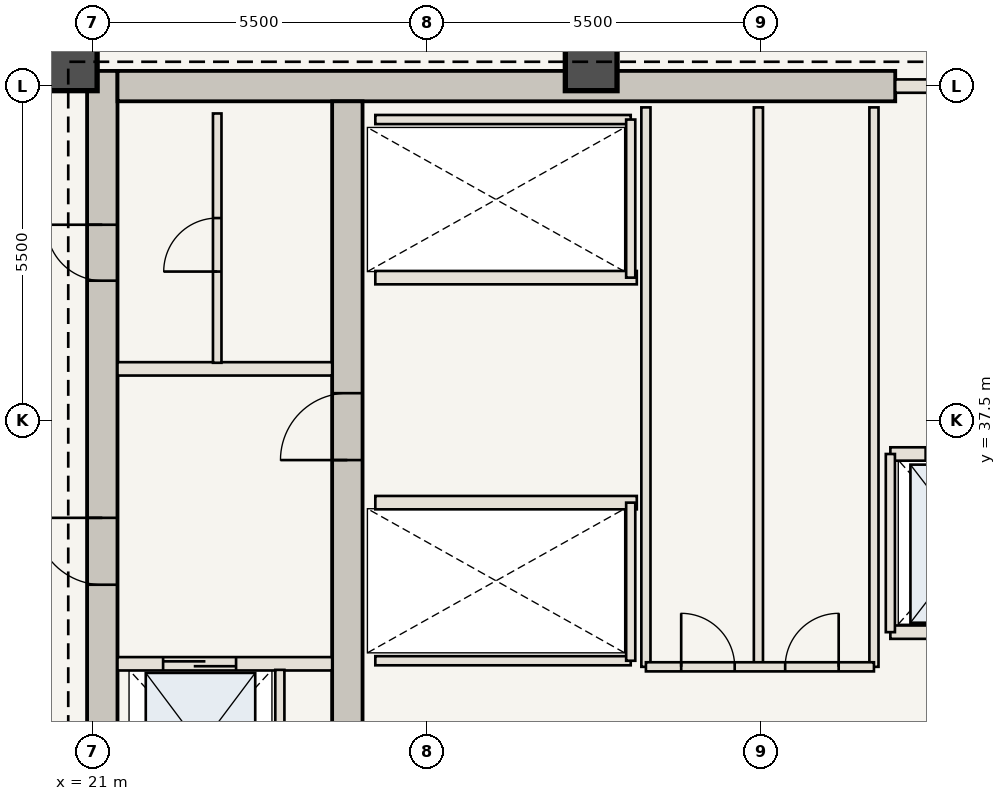
"""IFC4 building model, lengths in metres.
Left out: names, types, materials, properties, quantities, classifications, styles, units other than length and angle.
Written with IfcOpenShell. Run it as: python <this file> out.ifc"""

import sys

from ifc_helpers import new_model, si_unit, direction, frame, frame_2d, origin, origin_2d, place, context, subcontext, project, spatial, rectangle, extrude, element, fill, save


model = new_model("IFC4")
c1 = context("Model", 3, precision=1e-05, world=origin(), true_north=direction((0.0, 1.0)))
c2 = subcontext(c1, "Body", "Model", "MODEL_VIEW")
j1 = project(units=[si_unit("LENGTHUNIT", "METRE"), si_unit("PLANEANGLEUNIT", "RADIAN")], contexts=[c1])
p1 = place(None, origin())
s1 = spatial("IfcSite", under=j1, at=p1, CompositionType="ELEMENT")
p2 = place(p1, origin())
s2 = spatial("IfcBuilding", under=s1, at=p2, CompositionType="ELEMENT")
p3 = place(p2, frame((0.0, 0.0, 225.4)))
s3 = spatial("IfcBuildingStorey", under=s2, at=p3, CompositionType="ELEMENT", Elevation=225.4)
p4 = place(p3, frame((21.16, 30.6, 0.0), z_axis=(0.0, 0.0, 1.0), x_axis=(0.0, 1.0, 0.0)))
e1 = element("IfcWall", 1, at=p4, inside=s3, PredefinedType="SHEAR", context=c2, shape_type="SweptSolid", body=[
    extrude(rectangle(XDim=12.65, YDim=0.5, at=frame_2d((6.325, 0.0))), origin(), (0.0, 0.0, 1.0), 3.85),
])
p5 = place(p4, frame((4.2, 0.0, 0.0)))
e2 = element("IfcOpeningElement", 2, at=p5, cuts=e1, PredefinedType="OPENING", context=c2, shape_type="SweptSolid", body=[
    extrude(rectangle(XDim=1.1, YDim=2.15, at=frame_2d((0.55, 1.075))), frame((0.0, 0.26, 0.0), z_axis=(0.0, -1.0, 0.0), x_axis=(1.0, 0.0, 0.0)), (0.0, 0.0, 1.0), 0.52),
])
p6 = place(p4, frame((9.2, 0.0, 0.0)))
e3 = element("IfcOpeningElement", 3, at=p6, cuts=e1, PredefinedType="OPENING", context=c2, shape_type="SweptSolid", body=[
    extrude(rectangle(XDim=0.92, YDim=2.1, at=frame_2d((0.46, 1.05))), frame((0.0, 0.26, 0.0), z_axis=(0.0, -1.0, 0.0), x_axis=(1.0, 0.0, 0.0)), (0.0, 0.0, 1.0), 0.52),
])
p7 = place(p3, frame((21.41, 43.0, 0.0), z_axis=(0.0, 0.0, 1.0), x_axis=(1.0, 0.0, 0.0)))
e4 = element("IfcWall", 4, at=p7, inside=s3, PredefinedType="SHEAR", context=c2, shape_type="SweptSolid", body=[
    extrude(rectangle(XDim=12.79, YDim=0.5, at=frame_2d((6.395, 0.0))), origin(), (0.0, 0.0, 1.0), 3.85),
])
p8 = place(p3, frame((25.19, 30.6, 0.0), z_axis=(0.0, 0.0, 1.0), x_axis=(0.0, 1.0, 0.0)))
e5 = element("IfcWall", 5, at=p8, inside=s3, PredefinedType="SHEAR", context=c2, shape_type="SweptSolid", body=[
    extrude(rectangle(XDim=12.15, YDim=0.5, at=frame_2d((6.075, 0.0))), origin(), (0.0, 0.0, 1.0), 3.85),
])
p9 = place(p8, frame((6.25, 0.0, 0.0)))
e6 = element("IfcOpeningElement", 6, at=p9, cuts=e5, PredefinedType="OPENING", context=c2, shape_type="SweptSolid", body=[
    extrude(rectangle(XDim=1.1, YDim=2.15, at=frame_2d((0.55, 1.075))), frame((0.0, 0.26, 0.0), z_axis=(0.0, -1.0, 0.0), x_axis=(1.0, 0.0, 0.0)), (0.0, 0.0, 1.0), 0.52),
])
for number, where, z_axis, x_axis in (
    (7, (29.2, 43.35, 0.0), (0.0, 0.0, 1.0), (1.0, 0.0, 0.0)),
    (8, (20.65, 43.35, 0.0), (0.0, 0.0, 1.0), (1.0, 0.0, 0.0)),
):
    element("IfcColumn", number, at=place(p3, frame(where, z_axis=z_axis, x_axis=x_axis)), inside=s3, PredefinedType="COLUMN", context=c2, shape_type="SweptSolid", body=[
        extrude(rectangle(XDim=0.85, YDim=0.85, at=origin_2d()), origin(), (0.0, 0.0, 1.0), 3.85),
    ])
p10 = place(p3, frame((21.41, 33.5, 0.0), z_axis=(0.0, 0.0, 1.0), x_axis=(1.0, 0.0, 0.0)))
e9 = element("IfcWall", 9, at=p10, inside=s3, PredefinedType="STANDARD", context=c2, shape_type="SweptSolid", body=[
    extrude(rectangle(XDim=3.53, YDim=0.22, at=frame_2d((1.765, 0.0))), origin(), (0.0, 0.0, 1.0), 3.685),
])
p11 = place(p10, frame((0.75, 0.0, 0.0)))
e10 = element("IfcOpeningElement", 10, at=p11, cuts=e9, PredefinedType="OPENING", context=c2, shape_type="SweptSolid", body=[
    extrude(rectangle(XDim=1.2, YDim=2.2, at=frame_2d((0.6, 1.1))), frame((0.0, 0.12, 0.0), z_axis=(0.0, -1.0, 0.0), x_axis=(1.0, 0.0, 0.0)), (0.0, 0.0, 1.0), 0.24),
])
p12 = place(p3, frame((24.08, 30.75, 0.0), z_axis=(0.0, 0.0, 1.0), x_axis=(0.0, 1.0, 0.0)))
e11 = element("IfcWall", 11, at=p12, inside=s3, PredefinedType="STANDARD", context=c2, shape_type="SweptSolid", body=[
    extrude(rectangle(XDim=2.65, YDim=0.15, at=frame_2d((1.325, 0.0))), origin(), (0.0, 0.0, 1.0), 3.685),
])
p13 = place(p3, frame((21.41, 38.35, 0.0), z_axis=(0.0, 0.0, 1.0), x_axis=(1.0, 0.0, 0.0)))
e12 = element("IfcWall", 12, at=p13, inside=s3, PredefinedType="STANDARD", context=c2, shape_type="SweptSolid", body=[
    extrude(rectangle(XDim=3.53, YDim=0.22, at=frame_2d((1.765, 0.0))), origin(), (0.0, 0.0, 1.0), 3.685),
])
p14 = place(p3, frame((23.05, 38.45, 0.0), z_axis=(0.0, 0.0, 1.0), x_axis=(0.0, 1.0, 0.0)))
e13 = element("IfcWall", 13, at=p14, inside=s3, PredefinedType="STANDARD", context=c2, shape_type="SweptSolid", body=[
    extrude(rectangle(XDim=4.1, YDim=0.14, at=frame_2d((2.05, 0.0))), origin(), (0.0, 0.0, 1.0), 3.685),
])
p15 = place(p14, frame((1.5, 0.0, 0.0)))
e14 = element("IfcOpeningElement", 14, at=p15, cuts=e13, PredefinedType="OPENING", context=c2, shape_type="SweptSolid", body=[
    extrude(rectangle(XDim=0.88, YDim=2.1, at=frame_2d((0.44, 1.05))), frame((0.0, 0.08, 0.0), z_axis=(0.0, -1.0, 0.0), x_axis=(1.0, 0.0, 0.0)), (0.0, 0.0, 1.0), 0.16),
])
p16 = place(p3, frame((25.65, 36.15, 0.0), z_axis=(0.0, 0.0, 1.0), x_axis=(1.0, 0.0, 0.0)))
e15 = element("IfcWall", 15, at=p16, inside=s3, PredefinedType="STANDARD", context=c2, shape_type="SweptSolid", body=[
    extrude(rectangle(XDim=4.3, YDim=0.22, at=frame_2d((2.15, 0.0))), origin(), (0.0, 0.0, 1.0), 3.685),
])
p17 = place(p3, frame((25.65, 33.55, 0.0), z_axis=(0.0, 0.0, 1.0), x_axis=(1.0, 0.0, 0.0)))
e16 = element("IfcWall", 16, at=p17, inside=s3, PredefinedType="STANDARD", context=c2, shape_type="SweptSolid", body=[
    extrude(rectangle(XDim=4.2, YDim=0.15, at=frame_2d((2.1, 0.0))), origin(), (0.0, 0.0, 1.0), 3.685),
])
p18 = place(p3, frame((29.85, 33.55, 0.0), z_axis=(0.0, 0.0, 1.0), x_axis=(0.0, 1.0, 0.0)))
e17 = element("IfcWall", 17, at=p18, inside=s3, PredefinedType="STANDARD", context=c2, shape_type="SweptSolid", body=[
    extrude(rectangle(XDim=2.6, YDim=0.15, at=frame_2d((1.3, 0.0))), origin(), (0.0, 0.0, 1.0), 3.685),
])
p19 = place(p3, frame((25.65, 39.85, 0.0), z_axis=(0.0, 0.0, 1.0), x_axis=(1.0, 0.0, 0.0)))
e18 = element("IfcWall", 18, at=p19, inside=s3, PredefinedType="STANDARD", context=c2, shape_type="SweptSolid", body=[
    extrude(rectangle(XDim=4.3, YDim=0.22, at=frame_2d((2.15, 0.0))), origin(), (0.0, 0.0, 1.0), 3.685),
])
p20 = place(p3, frame((25.65, 42.45, 0.0), z_axis=(0.0, 0.0, 1.0), x_axis=(1.0, 0.0, 0.0)))
e19 = element("IfcWall", 19, at=p20, inside=s3, PredefinedType="STANDARD", context=c2, shape_type="SweptSolid", body=[
    extrude(rectangle(XDim=4.2, YDim=0.15, at=frame_2d((2.1, 0.0))), origin(), (0.0, 0.0, 1.0), 3.685),
])
p21 = place(p3, frame((29.85, 39.85, 0.0), z_axis=(0.0, 0.0, 1.0), x_axis=(0.0, 1.0, 0.0)))
e20 = element("IfcWall", 20, at=p21, inside=s3, PredefinedType="STANDARD", context=c2, shape_type="SweptSolid", body=[
    extrude(rectangle(XDim=2.6, YDim=0.15, at=frame_2d((1.3, 0.0))), origin(), (0.0, 0.0, 1.0), 3.685),
])
for number, where, z_axis, x_axis in (
    (21, (30.1, 33.45, 0.0), (0.0, 0.0, 1.0), (0.0, 1.0, 0.0)),
    (22, (31.95, 33.45, 0.0), (0.0, 0.0, 1.0), (0.0, 1.0, 0.0)),
    (23, (33.85, 33.45, 0.0), (0.0, 0.0, 1.0), (0.0, 1.0, 0.0)),
):
    element("IfcWall", number, at=place(p3, frame(where, z_axis=z_axis, x_axis=x_axis)), inside=s3, PredefinedType="STANDARD", context=c2, shape_type="SweptSolid", body=[
        extrude(rectangle(XDim=9.2, YDim=0.15, at=frame_2d((4.6, 0.0))), origin(), (0.0, 0.0, 1.0), 3.685),
    ])
p22 = place(p3, frame((30.1, 33.45, 0.0), z_axis=(0.0, 0.0, 1.0), x_axis=(1.0, 0.0, 0.0)))
e24 = element("IfcWall", 24, at=p22, inside=s3, PredefinedType="STANDARD", context=c2, shape_type="SweptSolid", body=[
    extrude(rectangle(XDim=3.75, YDim=0.15, at=frame_2d((1.875, 0.0))), origin(), (0.0, 0.0, 1.0), 3.685),
])
p23 = place(p22, frame((0.58, 0.0, 0.0)))
e25 = element("IfcOpeningElement", 25, at=p23, cuts=e24, PredefinedType="OPENING", context=c2, shape_type="SweptSolid", body=[
    extrude(rectangle(XDim=0.88, YDim=2.1, at=frame_2d((0.44, 1.05))), frame((0.0, 0.085, 0.0), z_axis=(0.0, -1.0, 0.0), x_axis=(1.0, 0.0, 0.0)), (0.0, 0.0, 1.0), 0.17),
])
p24 = place(p22, frame((2.29, 0.0, 0.0)))
e26 = element("IfcOpeningElement", 26, at=p24, cuts=e24, PredefinedType="OPENING", context=c2, shape_type="SweptSolid", body=[
    extrude(rectangle(XDim=0.88, YDim=2.1, at=frame_2d((0.44, 1.05))), frame((0.0, 0.085, 0.0), z_axis=(0.0, -1.0, 0.0), x_axis=(1.0, 0.0, 0.0)), (0.0, 0.0, 1.0), 0.17),
])
p25 = place(p3, frame((34.2, 43.0, 0.0), z_axis=(0.0, 0.0, 1.0), x_axis=(1.0, 0.0, 0.0)))
e27 = element("IfcWall", 27, at=p25, inside=s3, PredefinedType="STANDARD", context=c2, shape_type="SweptSolid", body=[
    extrude(rectangle(XDim=3.55, YDim=0.22, at=frame_2d((1.775, 0.0))), origin(), (0.0, 0.0, 1.0), 3.685),
])
p26 = place(p25, frame((1.4, 0.0, 0.0)))
e28 = element("IfcOpeningElement", 28, at=p26, cuts=e27, PredefinedType="OPENING", context=c2, shape_type="SweptSolid", body=[
    extrude(rectangle(XDim=1.1, YDim=2.15, at=frame_2d((0.55, 1.075))), frame((0.0, 0.12, 0.0), z_axis=(0.0, -1.0, 0.0), x_axis=(1.0, 0.0, 0.0)), (0.0, 0.0, 1.0), 0.24),
])
p27 = place(p3, frame((34.12, 36.95, 0.0), z_axis=(0.0, 0.0, 1.0), x_axis=(1.0, 0.0, 0.0)))
e29 = element("IfcWall", 29, at=p27, inside=s3, PredefinedType="STANDARD", context=c2, shape_type="SweptSolid", body=[
    extrude(rectangle(XDim=2.68, YDim=0.22, at=frame_2d((1.34, 0.0))), origin(), (0.0, 0.0, 1.0), 3.685),
])
p28 = place(p27, frame((0.58, 0.0, 0.0)))
e30 = element("IfcOpeningElement", 30, at=p28, cuts=e29, PredefinedType="OPENING", context=c2, shape_type="SweptSolid", body=[
    extrude(rectangle(XDim=1.2, YDim=2.2, at=frame_2d((0.6, 1.1))), frame((0.0, 0.12, 0.0), z_axis=(0.0, -1.0, 0.0), x_axis=(1.0, 0.0, 0.0)), (0.0, 0.0, 1.0), 0.24),
])
p29 = place(p3, frame((34.12, 34.02, 0.0), z_axis=(0.0, 0.0, 1.0), x_axis=(1.0, 0.0, 0.0)))
e31 = element("IfcWall", 31, at=p29, inside=s3, PredefinedType="STANDARD", context=c2, shape_type="SweptSolid", body=[
    extrude(rectangle(XDim=2.68, YDim=0.22, at=frame_2d((1.34, 0.0))), origin(), (0.0, 0.0, 1.0), 3.685),
])
p30 = place(p3, frame((34.12, 34.02, 0.0), z_axis=(0.0, 0.0, 1.0), x_axis=(0.0, 1.0, 0.0)))
e32 = element("IfcWall", 32, at=p30, inside=s3, PredefinedType="STANDARD", context=c2, shape_type="SweptSolid", body=[
    extrude(rectangle(XDim=2.93, YDim=0.15, at=frame_2d((1.465, 0.0))), origin(), (0.0, 0.0, 1.0), 3.685),
])
p31 = place(p5, origin())
e33 = element("IfcDoor", 33, at=p31, inside=s3, OperationType="SINGLE_SWING_RIGHT", PredefinedType="DOOR", context=c2, shape_type="SweptSolid", body=[
    extrude(rectangle(XDim=1.1, YDim=2.15, at=frame_2d((0.55, 1.075))), frame((0.0, 0.025, 0.0), z_axis=(0.0, -1.0, 0.0), x_axis=(1.0, 0.0, 0.0)), (0.0, 0.0, 1.0), 0.05),
])
fill(e2, e33)
p32 = place(p9, origin())
e34 = element("IfcDoor", 34, at=p32, inside=s3, OperationType="SINGLE_SWING_LEFT", PredefinedType="DOOR", context=c2, shape_type="SweptSolid", body=[
    extrude(rectangle(XDim=1.1, YDim=2.15, at=frame_2d((0.55, 1.075))), frame((0.0, 0.025, 0.0), z_axis=(0.0, -1.0, 0.0), x_axis=(1.0, 0.0, 0.0)), (0.0, 0.0, 1.0), 0.05),
])
fill(e6, e34)
p33 = place(p6, origin())
e35 = element("IfcDoor", 35, at=p33, inside=s3, OperationType="SINGLE_SWING_RIGHT", PredefinedType="DOOR", context=c2, shape_type="SweptSolid", body=[
    extrude(rectangle(XDim=0.92, YDim=2.1, at=frame_2d((0.46, 1.05))), frame((0.0, 0.025, 0.0), z_axis=(0.0, -1.0, 0.0), x_axis=(1.0, 0.0, 0.0)), (0.0, 0.0, 1.0), 0.05),
])
fill(e3, e35)
p34 = place(p11, origin())
e36 = element("IfcDoor", 36, at=p34, inside=s3, OperationType="DOUBLE_DOOR_SLIDING", PredefinedType="DOOR", context=c2, shape_type="SweptSolid", body=[
    extrude(rectangle(XDim=1.2, YDim=2.2, at=frame_2d((0.6, 1.1))), frame((0.0, 0.025, 0.0), z_axis=(0.0, -1.0, 0.0), x_axis=(1.0, 0.0, 0.0)), (0.0, 0.0, 1.0), 0.05),
])
fill(e10, e36)
p35 = place(p15, origin())
e37 = element("IfcDoor", 37, at=p35, inside=s3, OperationType="SINGLE_SWING_LEFT", PredefinedType="DOOR", context=c2, shape_type="SweptSolid", body=[
    extrude(rectangle(XDim=0.88, YDim=2.1, at=frame_2d((0.44, 1.05))), frame((0.0, 0.025, 0.0), z_axis=(0.0, -1.0, 0.0), x_axis=(1.0, 0.0, 0.0)), (0.0, 0.0, 1.0), 0.05),
])
fill(e14, e37)
p36 = place(p23, origin())
e38 = element("IfcDoor", 38, at=p36, inside=s3, OperationType="SINGLE_SWING_LEFT", PredefinedType="DOOR", context=c2, shape_type="SweptSolid", body=[
    extrude(rectangle(XDim=0.88, YDim=2.1, at=frame_2d((0.44, 1.05))), frame((0.0, 0.025, 0.0), z_axis=(0.0, -1.0, 0.0), x_axis=(1.0, 0.0, 0.0)), (0.0, 0.0, 1.0), 0.05),
])
fill(e25, e38)
p37 = place(p24, origin())
e39 = element("IfcDoor", 39, at=p37, inside=s3, OperationType="SINGLE_SWING_RIGHT", PredefinedType="DOOR", context=c2, shape_type="SweptSolid", body=[
    extrude(rectangle(XDim=0.88, YDim=2.1, at=frame_2d((0.44, 1.05))), frame((0.0, 0.025, 0.0), z_axis=(0.0, -1.0, 0.0), x_axis=(1.0, 0.0, 0.0)), (0.0, 0.0, 1.0), 0.05),
])
fill(e26, e39)
p38 = place(p28, origin())
e40 = element("IfcDoor", 40, at=p38, inside=s3, OperationType="DOUBLE_DOOR_SLIDING", PredefinedType="DOOR", context=c2, shape_type="SweptSolid", body=[
    extrude(rectangle(XDim=1.2, YDim=2.2, at=frame_2d((0.6, 1.1))), frame((0.0, 0.025, 0.0), z_axis=(0.0, -1.0, 0.0), x_axis=(1.0, 0.0, 0.0)), (0.0, 0.0, 1.0), 0.05),
])
fill(e30, e40)
save(model, sys.argv[1])
